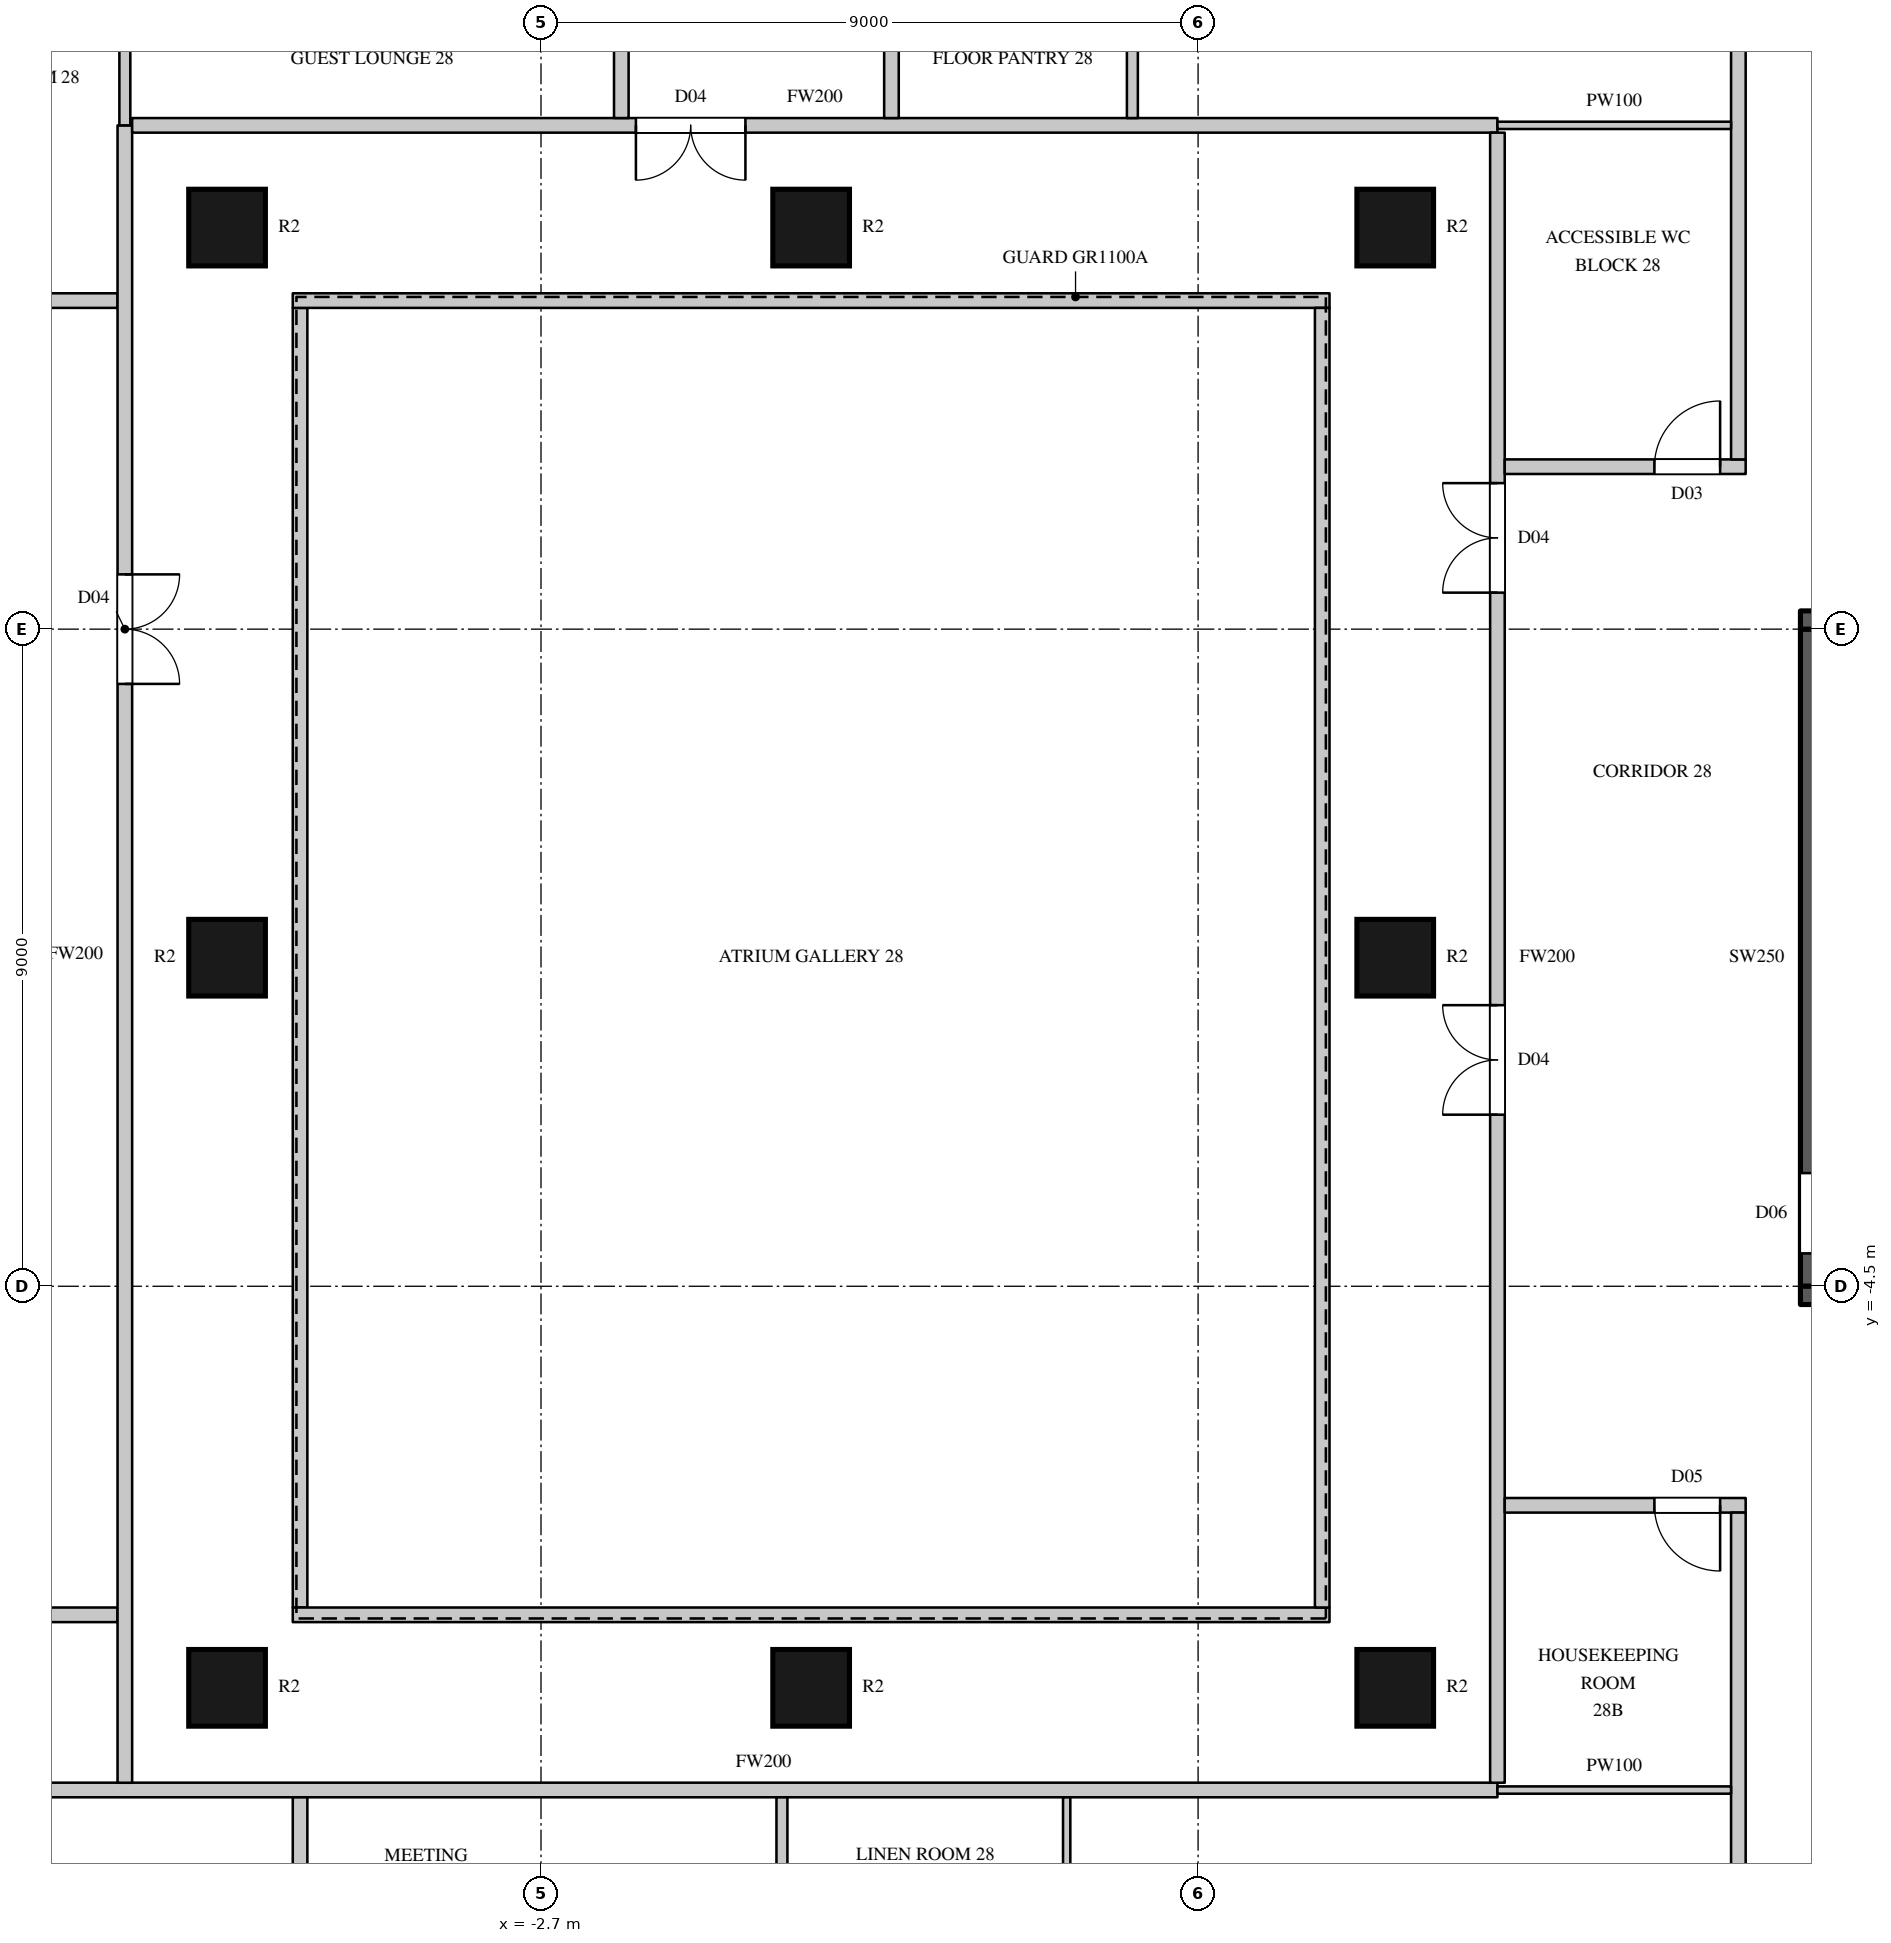
"""IFC4 building model, lengths in metres.
Left out: names, types, materials, properties, quantities, classifications, styles, units other than length and angle.
Written with IfcOpenShell. Run it as: python <this file> out.ifc"""

import sys

from ifc_helpers import new_model, si_unit, direction, frame, frame_2d, origin, origin_2d, place, context, subcontext, project, spatial, rectangle, circle, extrude, element, fill, save


model = new_model("IFC4")
c1 = context("Model", 3, precision=1e-05, world=origin(), true_north=direction((0.0, 1.0)))
c2 = subcontext(c1, "Body", "Model", "MODEL_VIEW")
j1 = project(units=[si_unit("LENGTHUNIT", "METRE"), si_unit("PLANEANGLEUNIT", "RADIAN")], contexts=[c1])
p1 = place(None, origin())
s1 = spatial("IfcSite", under=j1, at=p1, CompositionType="ELEMENT")
p2 = place(p1, origin())
s2 = spatial("IfcBuilding", under=s1, at=p2, CompositionType="ELEMENT")
p3 = place(p2, frame((0.0, 0.0, 131.1)))
s3 = spatial("IfcBuildingStorey", under=s2, at=p3, CompositionType="ELEMENT", Elevation=131.1)
for number, where, z_axis, x_axis in (
    (1, (-7.0, -10.0, 0.0), (0.0, 0.0, 1.0), (1.0, 0.0, 0.0)),
    (2, (-7.0, 0.0, 0.0), (0.0, 0.0, 1.0), (1.0, 0.0, 0.0)),
    (3, (-7.0, 10.0, 0.0), (0.0, 0.0, 1.0), (1.0, 0.0, 0.0)),
    (4, (1.0, -10.0, 0.0), (0.0, 0.0, 1.0), (1.0, 0.0, 0.0)),
    (5, (1.0, 10.0, 0.0), (0.0, 0.0, 1.0), (1.0, 0.0, 0.0)),
    (6, (9.0, -10.0, 0.0), (0.0, 0.0, 1.0), (1.0, 0.0, 0.0)),
    (7, (9.0, 0.0, 0.0), (0.0, 0.0, 1.0), (1.0, 0.0, 0.0)),
    (8, (9.0, 10.0, 0.0), (0.0, 0.0, 1.0), (1.0, 0.0, 0.0)),
):
    element("IfcColumn", number, at=place(p3, frame(where, z_axis=z_axis, x_axis=x_axis)), inside=s3, PredefinedType="COLUMN", context=c2, shape_type="SweptSolid", body=[
        extrude(circle(Radius=0.525, at=origin_2d()), origin(), (0.0, 0.0, 1.0), 3.6),
    ])
p4 = place(p3, frame((-13.97, -9.0, 0.0), z_axis=(0.0, 0.0, 1.0), x_axis=(1.0, 0.0, 0.0)))
e9 = element("IfcWall", 9, at=p4, inside=s3, PredefinedType="PARTITIONING", context=c2, shape_type="SweptSolid", body=[
    extrude(rectangle(XDim=5.47, YDim=0.2, at=frame_2d((2.735, 0.0))), origin(), (0.0, 0.0, 1.0), 3.3),
])
p5 = place(p4, frame((0.4, 0.0, 0.0)))
e10 = element("IfcOpeningElement", 10, at=p5, cuts=e9, PredefinedType="OPENING", context=c2, shape_type="SweptSolid", body=[
    extrude(rectangle(XDim=1.5, YDim=2.2, at=frame_2d((0.75, 1.1))), frame((0.0, 0.11, 0.0), z_axis=(0.0, -1.0, 0.0), x_axis=(1.0, 0.0, 0.0)), (0.0, 0.0, 1.0), 0.22),
])
p6 = place(p3, frame((-13.97, 9.0, 0.0), z_axis=(0.0, 0.0, 1.0), x_axis=(1.0, 0.0, 0.0)))
e11 = element("IfcWall", 11, at=p6, inside=s3, PredefinedType="PARTITIONING", context=c2, shape_type="SweptSolid", body=[
    extrude(rectangle(XDim=5.47, YDim=0.2, at=frame_2d((2.735, 0.0))), origin(), (0.0, 0.0, 1.0), 3.3),
])
p7 = place(p6, frame((0.4, 0.0, 0.0)))
e12 = element("IfcOpeningElement", 12, at=p7, cuts=e11, PredefinedType="OPENING", context=c2, shape_type="SweptSolid", body=[
    extrude(rectangle(XDim=1.5, YDim=2.2, at=frame_2d((0.75, 1.1))), frame((0.0, 0.11, 0.0), z_axis=(0.0, -1.0, 0.0), x_axis=(1.0, 0.0, 0.0)), (0.0, 0.0, 1.0), 0.22),
])
p8 = place(p3, frame((-9.7, -11.399, 0.0), z_axis=(0.0, 0.0, 1.0), x_axis=(1.0, 0.0, 0.0)))
e13 = element("IfcWall", 13, at=p8, inside=s3, PredefinedType="PARTITIONING", context=c2, shape_type="SweptSolid", body=[
    extrude(rectangle(XDim=20.1, YDim=0.2, at=frame_2d((10.05, 0.0))), origin(), (0.0, 0.0, 1.0), 3.3),
])
p9 = place(p3, frame((-8.4, -11.3, 0.0), z_axis=(0.0, 0.0, 1.0), x_axis=(0.0, 1.0, 0.0)))
e14 = element("IfcWall", 14, at=p9, inside=s3, PredefinedType="PARTITIONING", context=c2, shape_type="SweptSolid", body=[
    extrude(rectangle(XDim=22.7, YDim=0.2, at=frame_2d((11.35, 0.0))), origin(), (0.0, 0.0, 1.0), 3.3),
])
p10 = place(p9, frame((15.05, 0.0, 0.0)))
e15 = element("IfcOpeningElement", 15, at=p10, cuts=e14, PredefinedType="OPENING", context=c2, shape_type="SweptSolid", body=[
    extrude(rectangle(XDim=1.5, YDim=2.2, at=frame_2d((0.75, 1.1))), frame((0.0, 0.11, 0.0), z_axis=(0.0, -1.0, 0.0), x_axis=(1.0, 0.0, 0.0)), (0.0, 0.0, 1.0), 0.22),
])
p11 = place(p3, frame((-8.3, 11.4, 0.0), z_axis=(0.0, 0.0, 1.0), x_axis=(1.0, 0.0, 0.0)))
e16 = element("IfcWall", 16, at=p11, inside=s3, PredefinedType="PARTITIONING", context=c2, shape_type="SweptSolid", body=[
    extrude(rectangle(XDim=18.7, YDim=0.2, at=frame_2d((9.35, 0.0))), origin(), (0.0, 0.0, 1.0), 3.3),
])
p12 = place(p11, frame((6.9, 0.0, 0.0)))
e17 = element("IfcOpeningElement", 17, at=p12, cuts=e16, PredefinedType="OPENING", context=c2, shape_type="SweptSolid", body=[
    extrude(rectangle(XDim=1.5, YDim=2.2, at=frame_2d((0.75, 1.1))), frame((0.0, 0.11, 0.0), z_axis=(0.0, -1.0, 0.0), x_axis=(1.0, 0.0, 0.0)), (0.0, 0.0, 1.0), 0.22),
])
p13 = place(p3, frame((-6.0, -15.0, 0.0), z_axis=(0.0, 0.0, 1.0), x_axis=(0.0, 1.0, 0.0)))
e18 = element("IfcWall", 18, at=p13, inside=s3, PredefinedType="PARTITIONING", context=c2, shape_type="SweptSolid", body=[
    extrude(rectangle(XDim=3.5, YDim=0.2, at=frame_2d((1.75, 0.0))), origin(), (0.0, 0.0, 1.0), 3.3),
])
p14 = place(p13, frame((0.15, 0.0, 0.0)))
e19 = element("IfcOpeningElement", 19, at=p14, cuts=e18, PredefinedType="OPENING", context=c2, shape_type="SweptSolid", body=[
    extrude(rectangle(XDim=0.95, YDim=2.2, at=frame_2d((0.475, 1.1))), frame((0.0, 0.11, 0.0), z_axis=(0.0, -1.0, 0.0), x_axis=(1.0, 0.0, 0.0)), (0.0, 0.0, 1.0), 0.22),
])
p15 = place(p3, frame((-6.0, -8.9, 0.0), z_axis=(0.0, 0.0, 1.0), x_axis=(0.0, 1.0, 0.0)))
e20 = element("IfcWall", 20, at=p15, inside=s3, PredefinedType="PARTITIONING", context=c2, shape_type="SweptSolid", body=[
    extrude(rectangle(XDim=17.8, YDim=0.2, at=frame_2d((8.9, 0.0))), origin(), (0.0, 0.0, 1.0), 3.3),
])
for number, where, z_axis, x_axis in (
    (21, (-6.1, -9.0, 0.0), (0.0, 0.0, 1.0), (1.0, 0.0, 0.0)),
    (22, (-6.1, 9.0, 0.0), (0.0, 0.0, 1.0), (1.0, 0.0, 0.0)),
):
    element("IfcWall", number, at=place(p3, frame(where, z_axis=z_axis, x_axis=x_axis)), inside=s3, PredefinedType="PARTITIONING", context=c2, shape_type="SweptSolid", body=[
        extrude(rectangle(XDim=14.2, YDim=0.2, at=frame_2d((7.1, 0.0))), origin(), (0.0, 0.0, 1.0), 3.3),
    ])
p16 = place(p3, frame((-1.6, 11.5, 0.0), z_axis=(0.0, 0.0, 1.0), x_axis=(0.0, 1.0, 0.0)))
e23 = element("IfcWall", 23, at=p16, inside=s3, PredefinedType="PARTITIONING", context=c2, shape_type="SweptSolid", body=[
    extrude(rectangle(XDim=3.5, YDim=0.2, at=frame_2d((1.75, 0.0))), origin(), (0.0, 0.0, 1.0), 3.3),
])
p17 = place(p3, frame((2.1, 11.5, 0.0), z_axis=(0.0, 0.0, 1.0), x_axis=(0.0, 1.0, 0.0)))
e24 = element("IfcWall", 24, at=p17, inside=s3, PredefinedType="PARTITIONING", context=c2, shape_type="SweptSolid", body=[
    extrude(rectangle(XDim=3.5, YDim=0.2, at=frame_2d((1.75, 0.0))), origin(), (0.0, 0.0, 1.0), 3.3),
])
p18 = place(p17, frame((2.4, 0.0, 0.0)))
e25 = element("IfcOpeningElement", 25, at=p18, cuts=e24, PredefinedType="OPENING", context=c2, shape_type="SweptSolid", body=[
    extrude(rectangle(XDim=0.95, YDim=2.2, at=frame_2d((0.475, 1.1))), frame((0.0, 0.11, 0.0), z_axis=(0.0, -1.0, 0.0), x_axis=(1.0, 0.0, 0.0)), (0.0, 0.0, 1.0), 0.22),
])
p19 = place(p3, frame((8.0, -8.9, 0.0), z_axis=(0.0, 0.0, 1.0), x_axis=(0.0, 1.0, 0.0)))
e26 = element("IfcWall", 26, at=p19, inside=s3, PredefinedType="PARTITIONING", context=c2, shape_type="SweptSolid", body=[
    extrude(rectangle(XDim=17.8, YDim=0.2, at=frame_2d((8.9, 0.0))), origin(), (0.0, 0.0, 1.0), 3.3),
])
p20 = place(p3, frame((10.4, -11.3, 0.0), z_axis=(0.0, 0.0, 1.0), x_axis=(0.0, 1.0, 0.0)))
e27 = element("IfcWall", 27, at=p20, inside=s3, PredefinedType="PARTITIONING", context=c2, shape_type="SweptSolid", body=[
    extrude(rectangle(XDim=22.6, YDim=0.2, at=frame_2d((11.3, 0.0))), origin(), (0.0, 0.0, 1.0), 3.3),
])
p21 = place(p20, frame((16.3, 0.0, 0.0)))
e28 = element("IfcOpeningElement", 28, at=p21, cuts=e27, PredefinedType="OPENING", context=c2, shape_type="SweptSolid", body=[
    extrude(rectangle(XDim=1.5, YDim=2.2, at=frame_2d((0.75, 1.1))), frame((0.0, 0.11, 0.0), z_axis=(0.0, -1.0, 0.0), x_axis=(1.0, 0.0, 0.0)), (0.0, 0.0, 1.0), 0.22),
])
p22 = place(p20, frame((9.15, 0.0, 0.0)))
e29 = element("IfcOpeningElement", 29, at=p22, cuts=e27, PredefinedType="OPENING", context=c2, shape_type="SweptSolid", body=[
    extrude(rectangle(XDim=1.5, YDim=2.2, at=frame_2d((0.75, 1.1))), frame((0.0, 0.11, 0.0), z_axis=(0.0, -1.0, 0.0), x_axis=(1.0, 0.0, 0.0)), (0.0, 0.0, 1.0), 0.22),
])
p23 = place(p3, frame((10.5, -7.5, 0.0), z_axis=(0.0, 0.0, 1.0), x_axis=(1.0, 0.0, 0.0)))
e30 = element("IfcWall", 30, at=p23, inside=s3, PredefinedType="PARTITIONING", context=c2, shape_type="SweptSolid", body=[
    extrude(rectangle(XDim=3.3, YDim=0.2, at=frame_2d((1.65, 0.0))), origin(), (0.0, 0.0, 1.0), 3.3),
])
p24 = place(p23, frame((2.05, 0.0, 0.0)))
e31 = element("IfcOpeningElement", 31, at=p24, cuts=e30, PredefinedType="OPENING", context=c2, shape_type="SweptSolid", body=[
    extrude(rectangle(XDim=0.9, YDim=2.2, at=frame_2d((0.45, 1.1))), frame((0.0, 0.11, 0.0), z_axis=(0.0, -1.0, 0.0), x_axis=(1.0, 0.0, 0.0)), (0.0, 0.0, 1.0), 0.22),
])
p25 = place(p3, frame((10.5, 6.725, 0.0), z_axis=(0.0, 0.0, 1.0), x_axis=(1.0, 0.0, 0.0)))
e32 = element("IfcWall", 32, at=p25, inside=s3, PredefinedType="PARTITIONING", context=c2, shape_type="SweptSolid", body=[
    extrude(rectangle(XDim=3.3, YDim=0.2, at=frame_2d((1.65, 0.0))), origin(), (0.0, 0.0, 1.0), 3.3),
])
p26 = place(p25, frame((2.05, 0.0, 0.0)))
e33 = element("IfcOpeningElement", 33, at=p26, cuts=e32, PredefinedType="OPENING", context=c2, shape_type="SweptSolid", body=[
    extrude(rectangle(XDim=0.9, YDim=2.2, at=frame_2d((0.45, 1.1))), frame((0.0, 0.11, 0.0), z_axis=(0.0, -1.0, 0.0), x_axis=(1.0, 0.0, 0.0)), (0.0, 0.0, 1.0), 0.22),
])
p27 = place(p3, frame((13.7, -15.0, 0.0), z_axis=(0.0, 0.0, 1.0), x_axis=(0.0, 1.0, 0.0)))
e34 = element("IfcWall", 34, at=p27, inside=s3, PredefinedType="PARTITIONING", context=c2, shape_type="SweptSolid", body=[
    extrude(rectangle(XDim=7.4, YDim=0.2, at=frame_2d((3.7, 0.0))), origin(), (0.0, 0.0, 1.0), 3.3),
])
p28 = place(p3, frame((13.7, 6.825, 0.0), z_axis=(0.0, 0.0, 1.0), x_axis=(0.0, 1.0, 0.0)))
e35 = element("IfcWall", 35, at=p28, inside=s3, PredefinedType="PARTITIONING", context=c2, shape_type="SweptSolid", body=[
    extrude(rectangle(XDim=8.175, YDim=0.2, at=frame_2d((4.087, 0.0))), origin(), (0.0, 0.0, 1.0), 3.3),
])
p29 = place(p3, frame((-8.4, 11.4, 0.0), z_axis=(0.0, 0.0, 1.0), x_axis=(0.0, 1.0, 0.0)))
e36 = element("IfcWall", 36, at=p29, inside=s3, PredefinedType="PARTITIONING", context=c2, shape_type="SweptSolid", body=[
    extrude(rectangle(XDim=3.6, YDim=0.15, at=frame_2d((1.8, 0.0))), origin(), (0.0, 0.0, 1.0), 3.3),
])
for number, where, z_axis, x_axis in (
    (37, (0.6, -15.0, 0.0), (0.0, 0.0, 1.0), (0.0, 1.0, 0.0)),
    (38, (5.4, 11.5, 0.0), (0.0, 0.0, 1.0), (0.0, 1.0, 0.0)),
):
    element("IfcWall", number, at=place(p3, frame(where, z_axis=z_axis, x_axis=x_axis)), inside=s3, PredefinedType="PARTITIONING", context=c2, shape_type="SweptSolid", body=[
        extrude(rectangle(XDim=3.5, YDim=0.15, at=frame_2d((1.75, 0.0))), origin(), (0.0, 0.0, 1.0), 3.3),
    ])
p30 = place(p3, frame((14.675, -4.5, 0.0), z_axis=(0.0, 0.0, 1.0), x_axis=(0.0, 1.0, 0.0)))
e39 = element("IfcWall", 39, at=p30, inside=s3, PredefinedType="SHEAR", context=c2, shape_type="SweptSolid", body=[
    extrude(rectangle(XDim=9.0, YDim=0.25, at=frame_2d((4.5, 0.0))), origin(), (0.0, 0.0, 1.0), 3.3),
])
p31 = place(p30, frame((0.45, 0.0, 0.0)))
e40 = element("IfcOpeningElement", 40, at=p31, cuts=e39, PredefinedType="OPENING", context=c2, shape_type="SweptSolid", body=[
    extrude(rectangle(XDim=1.1, YDim=2.2, at=frame_2d((0.55, 1.1))), frame((0.0, 0.135, 0.0), z_axis=(0.0, -1.0, 0.0), x_axis=(1.0, 0.0, 0.0)), (0.0, 0.0, 1.0), 0.27),
])
for number, where, z_axis, x_axis in (
    (41, (14.55, -4.625, 0.0), (0.0, 0.0, 1.0), (1.0, 0.0, 0.0)),
    (42, (14.55, 4.625, 0.0), (0.0, 0.0, 1.0), (1.0, 0.0, 0.0)),
):
    element("IfcWall", number, at=place(p3, frame(where, z_axis=z_axis, x_axis=x_axis)), inside=s3, PredefinedType="SHEAR", context=c2, shape_type="SweptSolid", body=[
        extrude(rectangle(XDim=4.7, YDim=0.25, at=frame_2d((2.35, 0.0))), origin(), (0.0, 0.0, 1.0), 3.3),
    ])
p32 = place(p3, frame((4.5, -15.0, 0.0), z_axis=(0.0, 0.0, 1.0), x_axis=(0.0, 1.0, 0.0)))
e43 = element("IfcWall", 43, at=p32, inside=s3, PredefinedType="PARTITIONING", context=c2, shape_type="SweptSolid", body=[
    extrude(rectangle(XDim=3.5, YDim=0.1, at=frame_2d((1.75, 0.0))), origin(), (0.0, 0.0, 1.0), 3.3),
])
for number, where, z_axis, x_axis in (
    (44, (10.4, -11.4, 0.0), (0.0, 0.0, 1.0), (1.0, 0.0, 0.0)),
    (45, (10.4, 11.4, 0.0), (0.0, 0.0, 1.0), (1.0, 0.0, 0.0)),
):
    element("IfcWall", number, at=place(p3, frame(where, z_axis=z_axis, x_axis=x_axis)), inside=s3, PredefinedType="PARTITIONING", context=c2, shape_type="SweptSolid", body=[
        extrude(rectangle(XDim=3.2, YDim=0.1, at=frame_2d((1.6, 0.0))), origin(), (0.0, 0.0, 1.0), 3.3),
    ])
p33 = place(p10, origin())
e46 = element("IfcDoor", 46, at=p33, inside=s3, OperationType="DOUBLE_DOOR_SINGLE_SWING", PredefinedType="DOOR", context=c2, shape_type="SweptSolid", body=[
    extrude(rectangle(XDim=1.5, YDim=2.2, at=frame_2d((0.75, 1.1))), frame((0.0, 0.025, 0.0), z_axis=(0.0, -1.0, 0.0), x_axis=(1.0, 0.0, 0.0)), (0.0, 0.0, 1.0), 0.05),
])
fill(e15, e46)
p34 = place(p12, origin())
e47 = element("IfcDoor", 47, at=p34, inside=s3, OperationType="DOUBLE_DOOR_SINGLE_SWING", PredefinedType="DOOR", context=c2, shape_type="SweptSolid", body=[
    extrude(rectangle(XDim=1.5, YDim=2.2, at=frame_2d((0.75, 1.1))), frame((0.0, 0.025, 0.0), z_axis=(0.0, -1.0, 0.0), x_axis=(1.0, 0.0, 0.0)), (0.0, 0.0, 1.0), 0.05),
])
fill(e17, e47)
p35 = place(p21, origin())
e48 = element("IfcDoor", 48, at=p35, inside=s3, OperationType="DOUBLE_DOOR_SINGLE_SWING", PredefinedType="DOOR", context=c2, shape_type="SweptSolid", body=[
    extrude(rectangle(XDim=1.5, YDim=2.2, at=frame_2d((0.75, 1.1))), frame((0.0, 0.025, 0.0), z_axis=(0.0, -1.0, 0.0), x_axis=(1.0, 0.0, 0.0)), (0.0, 0.0, 1.0), 0.05),
])
fill(e28, e48)
p36 = place(p22, origin())
e49 = element("IfcDoor", 49, at=p36, inside=s3, OperationType="DOUBLE_DOOR_SINGLE_SWING", PredefinedType="DOOR", context=c2, shape_type="SweptSolid", body=[
    extrude(rectangle(XDim=1.5, YDim=2.2, at=frame_2d((0.75, 1.1))), frame((0.0, 0.025, 0.0), z_axis=(0.0, -1.0, 0.0), x_axis=(1.0, 0.0, 0.0)), (0.0, 0.0, 1.0), 0.05),
])
fill(e29, e49)
p37 = place(p24, origin())
e50 = element("IfcDoor", 50, at=p37, inside=s3, OperationType="SINGLE_SWING_LEFT", PredefinedType="DOOR", context=c2, shape_type="SweptSolid", body=[
    extrude(rectangle(XDim=0.9, YDim=2.2, at=frame_2d((0.45, 1.1))), frame((0.0, 0.025, 0.0), z_axis=(0.0, -1.0, 0.0), x_axis=(1.0, 0.0, 0.0)), (0.0, 0.0, 1.0), 0.05),
])
fill(e31, e50)
p38 = place(p26, origin())
e51 = element("IfcDoor", 51, at=p38, inside=s3, OperationType="SINGLE_SWING_RIGHT", PredefinedType="DOOR", context=c2, shape_type="SweptSolid", body=[
    extrude(rectangle(XDim=0.9, YDim=2.2, at=frame_2d((0.45, 1.1))), frame((0.0, 0.025, 0.0), z_axis=(0.0, -1.0, 0.0), x_axis=(1.0, 0.0, 0.0)), (0.0, 0.0, 1.0), 0.05),
])
fill(e33, e51)
p39 = place(p31, origin())
e52 = element("IfcDoor", 52, at=p39, inside=s3, OperationType="SINGLE_SWING_RIGHT", PredefinedType="DOOR", context=c2, shape_type="SweptSolid", body=[
    extrude(rectangle(XDim=1.1, YDim=2.2, at=frame_2d((0.55, 1.1))), frame((0.0, 0.025, 0.0), z_axis=(0.0, -1.0, 0.0), x_axis=(1.0, 0.0, 0.0)), (0.0, 0.0, 1.0), 0.05),
])
fill(e40, e52)
save(model, sys.argv[1])
